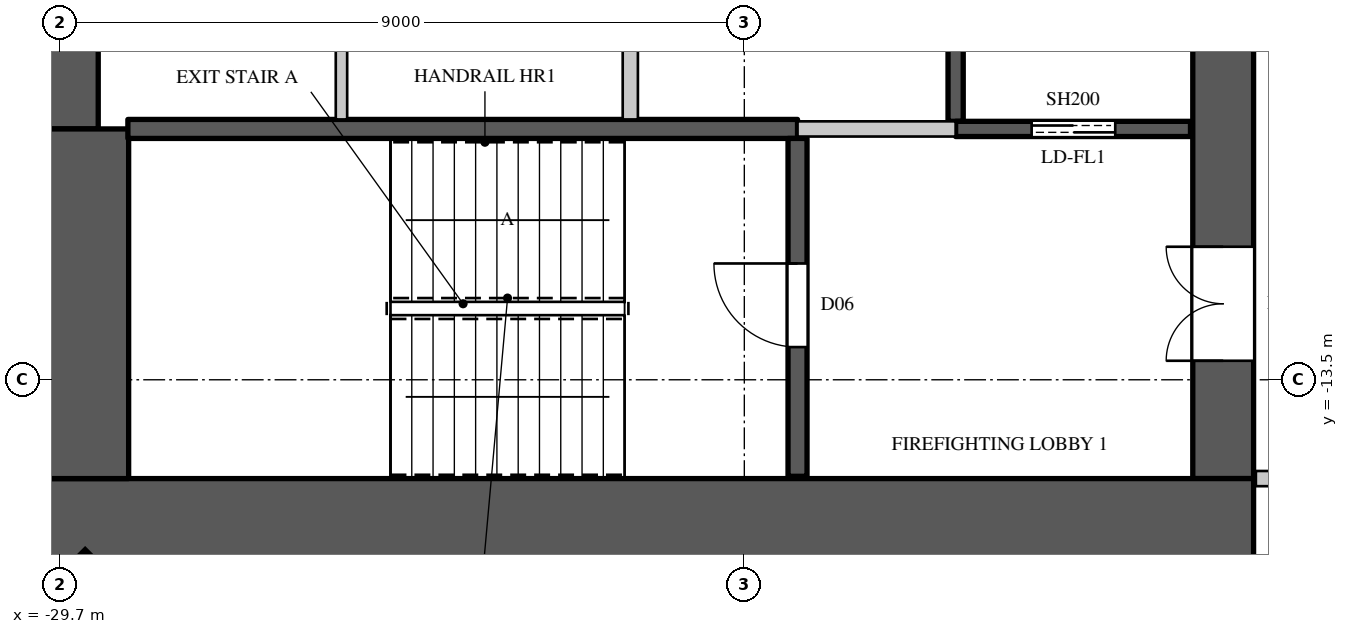
"""IFC4 building model, lengths in metres.
Left out: names, types, materials, properties, quantities, classifications, styles, units other than length and angle.
Written with IfcOpenShell. Run it as: python <this file> out.ifc"""

import sys

from ifc_helpers import new_model, si_unit, direction, frame, frame_2d, origin, origin_2d, place, context, subcontext, project, spatial, rectangle, extrude, element, fill, save


model = new_model("IFC4")
c1 = context("Model", 3, precision=1e-05, world=origin(), true_north=direction((0.0, 1.0)))
c2 = subcontext(c1, "Body", "Model", "MODEL_VIEW")
j1 = project(units=[si_unit("LENGTHUNIT", "METRE"), si_unit("PLANEANGLEUNIT", "RADIAN")], contexts=[c1])
p1 = place(None, origin())
s1 = spatial("IfcSite", under=j1, at=p1, CompositionType="ELEMENT")
p2 = place(p1, origin())
s2 = spatial("IfcBuilding", under=s1, at=p2, CompositionType="ELEMENT")
p3 = place(p2, frame((0.0, 0.0, 176.9)))
s3 = spatial("IfcBuildingStorey", under=s2, at=p3, CompositionType="ELEMENT", Elevation=176.9)
p4 = place(p3, frame((-29.443, -16.443, 0.0), z_axis=(0.0, 0.0, 1.0), x_axis=(0.707106781187, -0.707106781187, 0.0)))
e1 = element("IfcColumn", 1, at=p4, inside=s3, PredefinedType="COLUMN", context=c2, shape_type="SweptSolid", body=[
    extrude(rectangle(XDim=0.9, YDim=1.1, at=origin_2d()), origin(), (0.0, 0.0, 1.0), 4.1),
])
p5 = place(p3, frame((-30.0, -15.4, 0.0), z_axis=(0.0, 0.0, 1.0), x_axis=(1.0, 0.0, 0.0)))
e2 = element("IfcWall", 2, at=p5, inside=s3, PredefinedType="SHEAR", context=c2, shape_type="SweptSolid", body=[
    extrude(rectangle(XDim=16.0, YDim=1.2, at=frame_2d((8.0, 0.0))), origin(), (0.0, 0.0, 1.0), 4.1),
])
p6 = place(p3, frame((-14.4, -14.8, 0.0), z_axis=(0.0, 0.0, 1.0), x_axis=(0.0, 1.0, 0.0)))
e3 = element("IfcWall", 3, at=p6, inside=s3, PredefinedType="SHEAR", context=c2, shape_type="SweptSolid", body=[
    extrude(rectangle(XDim=29.6, YDim=0.8, at=frame_2d((14.8, 0.0))), origin(), (0.0, 0.0, 1.0), 4.1),
])
p7 = place(p6, frame((1.55, 0.0, 0.0)))
e4 = element("IfcOpeningElement", 4, at=p7, cuts=e3, PredefinedType="OPENING", context=c2, shape_type="SweptSolid", body=[
    extrude(rectangle(XDim=1.5, YDim=2.4, at=frame_2d((0.75, 1.2))), frame((0.0, 0.41, 0.0), z_axis=(0.0, -1.0, 0.0), x_axis=(1.0, 0.0, 0.0)), (0.0, 0.0, 1.0), 0.82),
])
p8 = place(p6, frame((26.55, 0.0, 0.0)))
e5 = element("IfcOpeningElement", 5, at=p8, cuts=e3, PredefinedType="OPENING", context=c2, shape_type="SweptSolid", body=[
    extrude(rectangle(XDim=1.5, YDim=2.4, at=frame_2d((0.75, 1.2))), frame((0.0, 0.41, 0.0), z_axis=(0.0, -1.0, 0.0), x_axis=(1.0, 0.0, 0.0)), (0.0, 0.0, 1.0), 0.82),
])
p9 = place(p6, frame((8.45, 0.0, 0.0)))
e6 = element("IfcOpeningElement", 6, at=p9, cuts=e3, PredefinedType="OPENING", context=c2, shape_type="SweptSolid", body=[
    extrude(rectangle(XDim=1.5, YDim=2.4, at=frame_2d((0.75, 1.2))), frame((0.0, 0.41, 0.0), z_axis=(0.0, -1.0, 0.0), x_axis=(1.0, 0.0, 0.0)), (0.0, 0.0, 1.0), 0.82),
])
p10 = place(p6, frame((19.65, 0.0, 0.0)))
e7 = element("IfcOpeningElement", 7, at=p10, cuts=e3, PredefinedType="OPENING", context=c2, shape_type="SweptSolid", body=[
    extrude(rectangle(XDim=1.5, YDim=2.4, at=frame_2d((0.75, 1.2))), frame((0.0, 0.41, 0.0), z_axis=(0.0, -1.0, 0.0), x_axis=(1.0, 0.0, 0.0)), (0.0, 0.0, 1.0), 0.82),
])
p11 = place(p6, frame((14.5, 0.0, 0.0)))
e8 = element("IfcOpeningElement", 8, at=p11, cuts=e3, PredefinedType="OPENING", context=c2, shape_type="SweptSolid", body=[
    extrude(rectangle(XDim=0.6, YDim=2.0, at=frame_2d((0.3, 1.0))), frame((0.0, 0.41, 0.0), z_axis=(0.0, -1.0, 0.0), x_axis=(1.0, 0.0, 0.0)), (0.0, 0.0, 1.0), 0.82),
])
p12 = place(p3, frame((-29.6, -10.2, 0.0), z_axis=(0.0, 0.0, 1.0), x_axis=(0.0, 1.0, 0.0)))
e9 = element("IfcWall", 9, at=p12, inside=s3, PredefinedType="SHEAR", context=c2, shape_type="SweptSolid", body=[
    extrude(rectangle(XDim=20.4, YDim=0.8, at=frame_2d((10.2, 0.0))), origin(), (0.0, 0.0, 1.0), 4.1),
])
p13 = place(p3, frame((-29.4, -14.8, 0.0), z_axis=(0.0, 0.0, 1.0), x_axis=(0.0, 1.0, 0.0)))
e10 = element("IfcWall", 10, at=p13, inside=s3, PredefinedType="SHEAR", context=c2, shape_type="SweptSolid", body=[
    extrude(rectangle(XDim=4.6, YDim=1.2, at=frame_2d((2.3, 0.0))), origin(), (0.0, 0.0, 1.0), 4.1),
])
p14 = place(p3, frame((-13.97, -14.8, 0.0), z_axis=(0.0, 0.0, 1.0), x_axis=(1.0, 0.0, 0.0)))
e11 = element("IfcWall", 11, at=p14, inside=s3, PredefinedType="PARTITIONING", context=c2, shape_type="SweptSolid", body=[
    extrude(rectangle(XDim=2.87, YDim=0.2, at=frame_2d((1.435, 0.0))), origin(), (0.0, 0.0, 1.0), 3.8),
])
p15 = place(p3, frame((-26.0, -10.075, 0.0), z_axis=(0.0, 0.0, 1.0), x_axis=(0.0, 1.0, 0.0)))
e12 = element("IfcWall", 12, at=p15, inside=s3, PredefinedType="PARTITIONING", context=c2, shape_type="SweptSolid", body=[
    extrude(rectangle(XDim=2.575, YDim=0.15, at=frame_2d((1.288, 0.0))), origin(), (0.0, 0.0, 1.0), 3.8),
])
p16 = place(p3, frame((-22.2, -10.075, 0.0), z_axis=(0.0, 0.0, 1.0), x_axis=(0.0, 1.0, 0.0)))
e13 = element("IfcWall", 13, at=p16, inside=s3, PredefinedType="PARTITIONING", context=c2, shape_type="SweptSolid", body=[
    extrude(rectangle(XDim=2.575, YDim=0.2, at=frame_2d((1.288, 0.0))), origin(), (0.0, 0.0, 1.0), 3.8),
])
p17 = place(p3, frame((-20.0, -10.2, 0.0), z_axis=(0.0, 0.0, 1.0), x_axis=(1.0, 0.0, 0.0)))
e14 = element("IfcWall", 14, at=p17, inside=s3, PredefinedType="PARTITIONING", context=c2, shape_type="SweptSolid", body=[
    extrude(rectangle(XDim=2.08, YDim=0.2, at=frame_2d((1.04, 0.0))), origin(), (0.0, 0.0, 1.0), 3.8),
])
p18 = place(p3, frame((-17.92, -10.1, 0.0), z_axis=(0.0, 0.0, 1.0), x_axis=(0.0, 1.0, 0.0)))
e15 = element("IfcWall", 15, at=p18, inside=s3, PredefinedType="SHEAR", context=c2, shape_type="SweptSolid", body=[
    extrude(rectangle(XDim=2.6, YDim=0.2, at=frame_2d((1.3, 0.0))), origin(), (0.0, 0.0, 1.0), 3.8),
])
p19 = place(p3, frame((-17.92, -10.2, 0.0), z_axis=(0.0, 0.0, 1.0), x_axis=(1.0, 0.0, 0.0)))
e16 = element("IfcWall", 16, at=p19, inside=s3, PredefinedType="SHEAR", context=c2, shape_type="SweptSolid", body=[
    extrude(rectangle(XDim=3.09, YDim=0.2, at=frame_2d((1.545, 0.0))), origin(), (0.0, 0.0, 1.0), 3.8),
])
p20 = place(p19, frame((1.0, 0.0, 0.0)))
e17 = element("IfcOpeningElement", 17, at=p20, cuts=e16, PredefinedType="OPENING", context=c2, shape_type="SweptSolid", body=[
    extrude(rectangle(XDim=1.1, YDim=2.2, at=frame_2d((0.55, 1.1))), frame((0.0, 0.11, 0.0), z_axis=(0.0, -1.0, 0.0), x_axis=(1.0, 0.0, 0.0)), (0.0, 0.0, 1.0), 0.22),
])
p21 = place(p3, frame((-28.81, -10.2, 0.0), z_axis=(0.0, 0.0, 1.0), x_axis=(1.0, 0.0, 0.0)))
e18 = element("IfcWall", 18, at=p21, inside=s3, PredefinedType="SHEAR", context=c2, shape_type="SweptSolid", body=[
    extrude(rectangle(XDim=8.81, YDim=0.25, at=frame_2d((4.405, 0.0))), origin(), (0.0, 0.0, 1.0), 3.8),
])
p22 = place(p3, frame((-20.0, -14.77, 0.0), z_axis=(0.0, 0.0, 1.0), x_axis=(0.0, 1.0, 0.0)))
e19 = element("IfcWall", 19, at=p22, inside=s3, PredefinedType="SHEAR", context=c2, shape_type="SweptSolid", body=[
    extrude(rectangle(XDim=4.445, YDim=0.25, at=frame_2d((2.223, 0.0))), origin(), (0.0, 0.0, 1.0), 3.8),
])
p23 = place(p22, frame((1.7, 0.0, 0.0)))
e20 = element("IfcOpeningElement", 20, at=p23, cuts=e19, PredefinedType="OPENING", context=c2, shape_type="SweptSolid", body=[
    extrude(rectangle(XDim=1.1, YDim=2.2, at=frame_2d((0.55, 1.1))), frame((0.0, 0.135, 0.0), z_axis=(0.0, -1.0, 0.0), x_axis=(1.0, 0.0, 0.0)), (0.0, 0.0, 1.0), 0.27),
])
p24 = place(p23, origin())
e21 = element("IfcDoor", 21, at=p24, inside=s3, OperationType="SINGLE_SWING_RIGHT", PredefinedType="DOOR", context=c2, shape_type="SweptSolid", body=[
    extrude(rectangle(XDim=1.1, YDim=2.2, at=frame_2d((0.55, 1.1))), frame((0.0, 0.025, 0.0), z_axis=(0.0, -1.0, 0.0), x_axis=(1.0, 0.0, 0.0)), (0.0, 0.0, 1.0), 0.05),
])
fill(e20, e21)
p25 = place(p20, origin())
e22 = element("IfcDoor", 22, at=p25, inside=s3, OperationType="DOUBLE_DOOR_SLIDING", PredefinedType="DOOR", context=c2, shape_type="SweptSolid", body=[
    extrude(rectangle(XDim=1.1, YDim=2.2, at=frame_2d((0.55, 1.1))), frame((0.0, 0.025, 0.0), z_axis=(0.0, -1.0, 0.0), x_axis=(1.0, 0.0, 0.0)), (0.0, 0.0, 1.0), 0.05),
])
fill(e17, e22)
p26 = place(p7, origin())
e23 = element("IfcDoor", 23, at=p26, inside=s3, OperationType="DOUBLE_DOOR_SINGLE_SWING", PredefinedType="DOOR", context=c2, shape_type="SweptSolid", body=[
    extrude(rectangle(XDim=1.5, YDim=2.4, at=frame_2d((0.75, 1.2))), frame((0.0, 0.395, 0.0), z_axis=(0.0, -1.0, 0.0), x_axis=(1.0, 0.0, 0.0)), (0.0, 0.0, 1.0), 0.05),
])
fill(e4, e23)
save(model, sys.argv[1])
